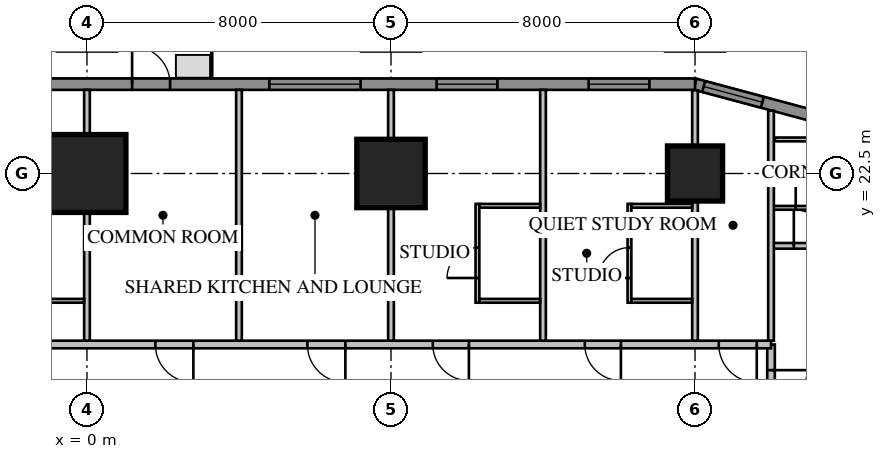
"""IFC4 building model, lengths in metres.
Left out: names, types, materials, properties, quantities, classifications, styles, units other than length and angle.
Written with IfcOpenShell. Run it as: python <this file> out.ifc"""

import sys

from ifc_helpers import new_model, si_unit, direction, frame, frame_2d, origin, origin_2d, place, context, subcontext, project, spatial, rectangle, extrude, element, fill, save


model = new_model("IFC4")
c1 = context("Model", 3, precision=1e-05, world=origin(), true_north=direction((0.0, 1.0)))
c2 = subcontext(c1, "Body", "Model", "MODEL_VIEW")
j1 = project(units=[si_unit("LENGTHUNIT", "METRE"), si_unit("PLANEANGLEUNIT", "RADIAN")], contexts=[c1])
p1 = place(None, origin())
s1 = spatial("IfcSite", under=j1, at=p1, CompositionType="ELEMENT")
p2 = place(p1, origin())
s2 = spatial("IfcBuilding", under=s1, at=p2, CompositionType="ELEMENT")
p3 = place(p2, frame((0.0, 0.0, 42.95)))
s3 = spatial("IfcBuildingStorey", under=s2, at=p3, CompositionType="ELEMENT", Elevation=42.95)
p4 = place(p3, frame((16.0, 22.5, 0.0), z_axis=(0.0, 0.0, 1.0), x_axis=(1.0, 0.0, 0.0)))
e1 = element("IfcColumn", 1, at=p4, inside=s3, PredefinedType="COLUMN", context=c2, shape_type="SweptSolid", body=[
    extrude(rectangle(XDim=1.45, YDim=1.45, at=origin_2d()), origin(), (0.0, 0.0, 1.0), 3.85),
])
p5 = place(p3, frame((8.0, 22.5, 0.0), z_axis=(0.0, 0.0, 1.0), x_axis=(1.0, 0.0, 0.0)))
e2 = element("IfcColumn", 2, at=p5, inside=s3, PredefinedType="COLUMN", context=c2, shape_type="SweptSolid", body=[
    extrude(rectangle(XDim=1.8, YDim=1.8, at=origin_2d()), origin(), (0.0, 0.0, 1.0), 3.85),
])
p6 = place(p3, frame((0.0, 22.5, 0.0), z_axis=(0.0, 0.0, 1.0), x_axis=(1.0, 0.0, 0.0)))
e3 = element("IfcColumn", 3, at=p6, inside=s3, PredefinedType="COLUMN", context=c2, shape_type="SweptSolid", body=[
    extrude(rectangle(XDim=2.05, YDim=2.05, at=origin_2d()), origin(), (0.0, 0.0, 1.0), 3.85),
])
p7 = place(p3, frame((20.425, 23.664, 0.0), z_axis=(0.0, 0.0, 1.0), x_axis=(-0.965920218567, 0.258839972501, 0.0)))
e4 = element("IfcWall", 4, at=p7, inside=s3, PredefinedType="SOLIDWALL", context=c2, shape_type="SweptSolid", body=[
    extrude(rectangle(XDim=4.581, YDim=0.3, at=frame_2d((2.291, 0.0))), origin(), (0.0, 0.0, 1.0), 3.65),
])
p8 = place(p7, frame((2.746, 0.0, 0.75)))
e5 = element("IfcOpeningElement", 5, at=p8, cuts=e4, PredefinedType="OPENING", context=c2, shape_type="SweptSolid", body=[
    extrude(rectangle(XDim=1.6, YDim=1.8, at=frame_2d((0.8, 0.9))), frame((0.0, 0.17, 0.0), z_axis=(0.0, -1.0, 0.0), x_axis=(1.0, 0.0, 0.0)), (0.0, 0.0, 1.0), 0.34),
])
p9 = place(p3, frame((16.0, 24.85, 0.0), z_axis=(0.0, 0.0, 1.0), x_axis=(-1.0, 0.0, 0.0)))
e6 = element("IfcWall", 6, at=p9, inside=s3, PredefinedType="SOLIDWALL", context=c2, shape_type="SweptSolid", body=[
    extrude(rectangle(XDim=32.0, YDim=0.3, at=frame_2d((16.0, 0.0))), origin(), (0.0, 0.0, 1.0), 3.65),
])
p10 = place(p9, frame((1.2, 0.0, 0.75)))
e7 = element("IfcOpeningElement", 7, at=p10, cuts=e6, PredefinedType="OPENING", context=c2, shape_type="SweptSolid", body=[
    extrude(rectangle(XDim=1.6, YDim=1.8, at=frame_2d((0.8, 0.9))), frame((0.0, 0.17, 0.0), z_axis=(0.0, -1.0, 0.0), x_axis=(1.0, 0.0, 0.0)), (0.0, 0.0, 1.0), 0.34),
])
p11 = place(p9, frame((5.2, 0.0, 0.75)))
e8 = element("IfcOpeningElement", 8, at=p11, cuts=e6, PredefinedType="OPENING", context=c2, shape_type="SweptSolid", body=[
    extrude(rectangle(XDim=1.6, YDim=1.8, at=frame_2d((0.8, 0.9))), frame((0.0, 0.17, 0.0), z_axis=(0.0, -1.0, 0.0), x_axis=(1.0, 0.0, 0.0)), (0.0, 0.0, 1.0), 0.34),
])
p12 = place(p9, frame((17.2, 0.0, 0.75)))
e9 = element("IfcOpeningElement", 9, at=p12, cuts=e6, PredefinedType="OPENING", context=c2, shape_type="SweptSolid", body=[
    extrude(rectangle(XDim=1.6, YDim=1.8, at=frame_2d((0.8, 0.9))), frame((0.0, 0.17, 0.0), z_axis=(0.0, -1.0, 0.0), x_axis=(1.0, 0.0, 0.0)), (0.0, 0.0, 1.0), 0.34),
])
p13 = place(p9, frame((21.2, 0.0, 0.75)))
e10 = element("IfcOpeningElement", 10, at=p13, cuts=e6, PredefinedType="OPENING", context=c2, shape_type="SweptSolid", body=[
    extrude(rectangle(XDim=1.6, YDim=1.8, at=frame_2d((0.8, 0.9))), frame((0.0, 0.17, 0.0), z_axis=(0.0, -1.0, 0.0), x_axis=(1.0, 0.0, 0.0)), (0.0, 0.0, 1.0), 0.34),
])
p14 = place(p9, frame((25.2, 0.0, 0.75)))
e11 = element("IfcOpeningElement", 11, at=p14, cuts=e6, PredefinedType="OPENING", context=c2, shape_type="SweptSolid", body=[
    extrude(rectangle(XDim=1.6, YDim=1.8, at=frame_2d((0.8, 0.9))), frame((0.0, 0.17, 0.0), z_axis=(0.0, -1.0, 0.0), x_axis=(1.0, 0.0, 0.0)), (0.0, 0.0, 1.0), 0.34),
])
p15 = place(p9, frame((29.2, 0.0, 0.75)))
e12 = element("IfcOpeningElement", 12, at=p15, cuts=e6, PredefinedType="OPENING", context=c2, shape_type="SweptSolid", body=[
    extrude(rectangle(XDim=1.6, YDim=1.8, at=frame_2d((0.8, 0.9))), frame((0.0, 0.17, 0.0), z_axis=(0.0, -1.0, 0.0), x_axis=(1.0, 0.0, 0.0)), (0.0, 0.0, 1.0), 0.34),
])
p16 = place(p9, frame((8.8, 0.0, 0.75)))
e13 = element("IfcOpeningElement", 13, at=p16, cuts=e6, PredefinedType="OPENING", context=c2, shape_type="SweptSolid", body=[
    extrude(rectangle(XDim=2.4, YDim=1.8, at=frame_2d((1.2, 0.9))), frame((0.0, 0.17, 0.0), z_axis=(0.0, -1.0, 0.0), x_axis=(1.0, 0.0, 0.0)), (0.0, 0.0, 1.0), 0.34),
])
p17 = place(p9, frame((13.812, 0.0, 0.0)))
e14 = element("IfcOpeningElement", 14, at=p17, cuts=e6, PredefinedType="OPENING", context=c2, shape_type="SweptSolid", body=[
    extrude(rectangle(XDim=1.0, YDim=2.4, at=frame_2d((0.5, 1.2))), frame((0.0, 0.17, 0.0), z_axis=(0.0, -1.0, 0.0), x_axis=(1.0, 0.0, 0.0)), (0.0, 0.0, 1.0), 0.34),
])
p18 = place(p3, frame((18.0, -18.0, 0.0), z_axis=(0.0, 0.0, 1.0), x_axis=(0.0, 1.0, 0.0)))
e15 = element("IfcWall", 15, at=p18, inside=s3, PredefinedType="PARTITIONING", context=c2, shape_type="SweptSolid", body=[
    extrude(rectangle(XDim=36.0, YDim=0.2, at=frame_2d((18.0, 0.0))), origin(), (0.0, 0.0, 1.0), 3.65),
])
p19 = place(p18, frame((10.4, 0.0, 0.0)))
e16 = element("IfcOpeningElement", 16, at=p19, cuts=e15, PredefinedType="OPENING", context=c2, shape_type="SweptSolid", body=[
    extrude(rectangle(XDim=1.0, YDim=2.1, at=frame_2d((0.5, 1.05))), frame((0.0, 0.12, 0.0), z_axis=(0.0, -1.0, 0.0), x_axis=(1.0, 0.0, 0.0)), (0.0, 0.0, 1.0), 0.24),
])
p20 = place(p18, frame((14.4, 0.0, 0.0)))
e17 = element("IfcOpeningElement", 17, at=p20, cuts=e15, PredefinedType="OPENING", context=c2, shape_type="SweptSolid", body=[
    extrude(rectangle(XDim=1.0, YDim=2.1, at=frame_2d((0.5, 1.05))), frame((0.0, 0.12, 0.0), z_axis=(0.0, -1.0, 0.0), x_axis=(1.0, 0.0, 0.0)), (0.0, 0.0, 1.0), 0.24),
])
p21 = place(p18, frame((0.375, 0.0, 0.0)))
e18 = element("IfcOpeningElement", 18, at=p21, cuts=e15, PredefinedType="OPENING", context=c2, shape_type="SweptSolid", body=[
    extrude(rectangle(XDim=1.0, YDim=2.1, at=frame_2d((0.5, 1.05))), frame((0.0, 0.12, 0.0), z_axis=(0.0, -1.0, 0.0), x_axis=(1.0, 0.0, 0.0)), (0.0, 0.0, 1.0), 0.24),
])
p22 = place(p18, frame((34.375, 0.0, 0.0)))
e19 = element("IfcOpeningElement", 19, at=p22, cuts=e15, PredefinedType="OPENING", context=c2, shape_type="SweptSolid", body=[
    extrude(rectangle(XDim=0.95, YDim=2.1, at=frame_2d((0.475, 1.05))), frame((0.0, 0.12, 0.0), z_axis=(0.0, -1.0, 0.0), x_axis=(1.0, 0.0, 0.0)), (0.0, 0.0, 1.0), 0.24),
])
p23 = place(p3, frame((18.065, 21.596, 0.0), z_axis=(0.0, 0.0, 1.0), x_axis=(1.0, 0.0, 0.0)))
e20 = element("IfcWall", 20, at=p23, inside=s3, PredefinedType="PARTITIONING", context=c2, shape_type="SweptSolid", body=[
    extrude(rectangle(XDim=2.335, YDim=0.1, at=frame_2d((1.167, 0.0))), origin(), (0.0, 0.0, 1.0), 3.65),
])
p24 = place(p23, frame((0.585, 0.0, 0.0)))
e21 = element("IfcOpeningElement", 21, at=p24, cuts=e20, PredefinedType="OPENING", context=c2, shape_type="SweptSolid", body=[
    extrude(rectangle(XDim=0.8, YDim=2.1, at=frame_2d((0.4, 1.05))), frame((0.0, 0.07, 0.0), z_axis=(0.0, -1.0, 0.0), x_axis=(1.0, 0.0, 0.0)), (0.0, 0.0, 1.0), 0.14),
])
p25 = place(p3, frame((18.1, 23.396, 0.0), z_axis=(0.0, 0.0, 1.0), x_axis=(1.0, 0.0, 0.0)))
e22 = element("IfcWall", 22, at=p25, inside=s3, PredefinedType="PARTITIONING", context=c2, shape_type="SweptSolid", body=[
    extrude(rectangle(XDim=2.3, YDim=0.1, at=frame_2d((1.15, 0.0))), origin(), (0.0, 0.0, 1.0), 3.65),
])
p26 = place(p3, frame((18.065, 20.596, 0.0), z_axis=(0.0, 0.0, 1.0), x_axis=(1.0, 0.0, 0.0)))
e23 = element("IfcWall", 23, at=p26, inside=s3, PredefinedType="PARTITIONING", context=c2, shape_type="SweptSolid", body=[
    extrude(rectangle(XDim=5.209, YDim=0.15, at=frame_2d((2.604, 0.0))), origin(), (0.0, 0.0, 1.0), 3.65),
])
p27 = place(p26, frame((0.535, 0.0, 0.0)))
e24 = element("IfcOpeningElement", 24, at=p27, cuts=e23, PredefinedType="OPENING", context=c2, shape_type="SweptSolid", body=[
    extrude(rectangle(XDim=0.95, YDim=2.1, at=frame_2d((0.475, 1.05))), frame((0.0, 0.095, 0.0), z_axis=(0.0, -1.0, 0.0), x_axis=(1.0, 0.0, 0.0)), (0.0, 0.0, 1.0), 0.19),
])
p28 = place(p3, frame((18.0, 18.0, 0.0), z_axis=(0.0, 0.0, 1.0), x_axis=(-1.0, 0.0, 0.0)))
e25 = element("IfcWall", 25, at=p28, inside=s3, PredefinedType="PARTITIONING", context=c2, shape_type="SweptSolid", body=[
    extrude(rectangle(XDim=36.0, YDim=0.2, at=frame_2d((18.0, 0.0))), origin(), (0.0, 0.0, 1.0), 3.65),
])
p29 = place(p28, frame((0.375, 0.0, 0.0)))
e26 = element("IfcOpeningElement", 26, at=p29, cuts=e25, PredefinedType="OPENING", context=c2, shape_type="SweptSolid", body=[
    extrude(rectangle(XDim=1.0, YDim=2.1, at=frame_2d((0.5, 1.05))), frame((0.0, 0.12, 0.0), z_axis=(0.0, -1.0, 0.0), x_axis=(1.0, 0.0, 0.0)), (0.0, 0.0, 1.0), 0.24),
])
p30 = place(p28, frame((3.95, 0.0, 0.0)))
e27 = element("IfcOpeningElement", 27, at=p30, cuts=e25, PredefinedType="OPENING", context=c2, shape_type="SweptSolid", body=[
    extrude(rectangle(XDim=0.95, YDim=2.1, at=frame_2d((0.475, 1.05))), frame((0.0, 0.12, 0.0), z_axis=(0.0, -1.0, 0.0), x_axis=(1.0, 0.0, 0.0)), (0.0, 0.0, 1.0), 0.24),
])
p31 = place(p28, frame((7.95, 0.0, 0.0)))
e28 = element("IfcOpeningElement", 28, at=p31, cuts=e25, PredefinedType="OPENING", context=c2, shape_type="SweptSolid", body=[
    extrude(rectangle(XDim=0.95, YDim=2.1, at=frame_2d((0.475, 1.05))), frame((0.0, 0.12, 0.0), z_axis=(0.0, -1.0, 0.0), x_axis=(1.0, 0.0, 0.0)), (0.0, 0.0, 1.0), 0.24),
])
p32 = place(p28, frame((19.95, 0.0, 0.0)))
e29 = element("IfcOpeningElement", 29, at=p32, cuts=e25, PredefinedType="OPENING", context=c2, shape_type="SweptSolid", body=[
    extrude(rectangle(XDim=0.95, YDim=2.1, at=frame_2d((0.475, 1.05))), frame((0.0, 0.12, 0.0), z_axis=(0.0, -1.0, 0.0), x_axis=(1.0, 0.0, 0.0)), (0.0, 0.0, 1.0), 0.24),
])
p33 = place(p28, frame((23.95, 0.0, 0.0)))
e30 = element("IfcOpeningElement", 30, at=p33, cuts=e25, PredefinedType="OPENING", context=c2, shape_type="SweptSolid", body=[
    extrude(rectangle(XDim=0.95, YDim=2.1, at=frame_2d((0.475, 1.05))), frame((0.0, 0.12, 0.0), z_axis=(0.0, -1.0, 0.0), x_axis=(1.0, 0.0, 0.0)), (0.0, 0.0, 1.0), 0.24),
])
p34 = place(p28, frame((27.95, 0.0, 0.0)))
e31 = element("IfcOpeningElement", 31, at=p34, cuts=e25, PredefinedType="OPENING", context=c2, shape_type="SweptSolid", body=[
    extrude(rectangle(XDim=0.95, YDim=2.1, at=frame_2d((0.475, 1.05))), frame((0.0, 0.12, 0.0), z_axis=(0.0, -1.0, 0.0), x_axis=(1.0, 0.0, 0.0)), (0.0, 0.0, 1.0), 0.24),
])
p35 = place(p28, frame((31.95, 0.0, 0.0)))
e32 = element("IfcOpeningElement", 32, at=p35, cuts=e25, PredefinedType="OPENING", context=c2, shape_type="SweptSolid", body=[
    extrude(rectangle(XDim=0.95, YDim=2.1, at=frame_2d((0.475, 1.05))), frame((0.0, 0.12, 0.0), z_axis=(0.0, -1.0, 0.0), x_axis=(1.0, 0.0, 0.0)), (0.0, 0.0, 1.0), 0.24),
])
p36 = place(p28, frame((34.375, 0.0, 0.0)))
e33 = element("IfcOpeningElement", 33, at=p36, cuts=e25, PredefinedType="OPENING", context=c2, shape_type="SweptSolid", body=[
    extrude(rectangle(XDim=0.95, YDim=2.1, at=frame_2d((0.475, 1.05))), frame((0.0, 0.12, 0.0), z_axis=(0.0, -1.0, 0.0), x_axis=(1.0, 0.0, 0.0)), (0.0, 0.0, 1.0), 0.24),
])
p37 = place(p28, frame((11.2, 0.0, 0.0)))
e34 = element("IfcOpeningElement", 34, at=p37, cuts=e25, PredefinedType="OPENING", context=c2, shape_type="SweptSolid", body=[
    extrude(rectangle(XDim=1.0, YDim=2.1, at=frame_2d((0.5, 1.05))), frame((0.0, 0.12, 0.0), z_axis=(0.0, -1.0, 0.0), x_axis=(1.0, 0.0, 0.0)), (0.0, 0.0, 1.0), 0.24),
])
p38 = place(p28, frame((15.2, 0.0, 0.0)))
e35 = element("IfcOpeningElement", 35, at=p38, cuts=e25, PredefinedType="OPENING", context=c2, shape_type="SweptSolid", body=[
    extrude(rectangle(XDim=1.0, YDim=2.1, at=frame_2d((0.5, 1.05))), frame((0.0, 0.12, 0.0), z_axis=(0.0, -1.0, 0.0), x_axis=(1.0, 0.0, 0.0)), (0.0, 0.0, 1.0), 0.24),
])
p39 = place(p3, frame((18.0, 18.1, 0.0), z_axis=(0.0, 0.0, 1.0), x_axis=(0.0, 1.0, 0.0)))
e36 = element("IfcWall", 36, at=p39, inside=s3, PredefinedType="PARTITIONING", context=c2, shape_type="SweptSolid", body=[
    extrude(rectangle(XDim=6.053, YDim=0.15, at=frame_2d((3.027, 0.0))), origin(), (0.0, 0.0, 1.0), 3.65),
])
p40 = place(p3, frame((16.0, 18.1, 0.0), z_axis=(0.0, 0.0, 1.0), x_axis=(0.0, 1.0, 0.0)))
e37 = element("IfcWall", 37, at=p40, inside=s3, PredefinedType="PARTITIONING", context=c2, shape_type="SweptSolid", body=[
    extrude(rectangle(XDim=6.589, YDim=0.15, at=frame_2d((3.295, 0.0))), origin(), (0.0, 0.0, 1.0), 3.65),
])
for number, where, z_axis, x_axis in (
    (38, (12.0, 18.1, 0.0), (0.0, 0.0, 1.0), (0.0, 1.0, 0.0)),
    (39, (8.0, 18.1, 0.0), (0.0, 0.0, 1.0), (0.0, 1.0, 0.0)),
    (40, (4.0, 18.1, 0.0), (0.0, 0.0, 1.0), (0.0, 1.0, 0.0)),
):
    element("IfcWall", number, at=place(p3, frame(where, z_axis=z_axis, x_axis=x_axis)), inside=s3, PredefinedType="PARTITIONING", context=c2, shape_type="SweptSolid", body=[
        extrude(rectangle(XDim=6.6, YDim=0.15, at=frame_2d((3.3, 0.0))), origin(), (0.0, 0.0, 1.0), 3.65),
    ])
p41 = place(p3, frame((0.0, 18.1, 0.0), z_axis=(0.0, 0.0, 1.0), x_axis=(0.0, 1.0, 0.0)))
e41 = element("IfcWall", 41, at=p41, inside=s3, PredefinedType="PARTITIONING", context=c2, shape_type="SweptSolid", body=[
    extrude(rectangle(XDim=6.6, YDim=0.15, at=frame_2d((3.3, 0.0))), origin(), (0.0, 0.0, 1.0), 2.809),
])
p42 = place(p3, frame((14.275, 19.1, 0.0), z_axis=(0.0, 0.0, 1.0), x_axis=(0.0, 1.0, 0.0)))
e42 = element("IfcWall", 42, at=p42, inside=s3, PredefinedType="PARTITIONING", context=c2, shape_type="SweptSolid", body=[
    extrude(rectangle(XDim=2.6, YDim=0.1, at=frame_2d((1.3, 0.0))), origin(), (0.0, 0.0, 1.0), 3.65),
])
p43 = place(p42, frame((0.65, 0.0, 0.0)))
e43 = element("IfcOpeningElement", 43, at=p43, cuts=e42, PredefinedType="OPENING", context=c2, shape_type="SweptSolid", body=[
    extrude(rectangle(XDim=0.8, YDim=2.1, at=frame_2d((0.4, 1.05))), frame((0.0, 0.07, 0.0), z_axis=(0.0, -1.0, 0.0), x_axis=(1.0, 0.0, 0.0)), (0.0, 0.0, 1.0), 0.14),
])
p44 = place(p3, frame((15.925, 21.65, 0.0), z_axis=(0.0, 0.0, 1.0), x_axis=(-1.0, 0.0, 0.0)))
e44 = element("IfcWall", 44, at=p44, inside=s3, PredefinedType="PARTITIONING", context=c2, shape_type="SweptSolid", body=[
    extrude(rectangle(XDim=1.6, YDim=0.1, at=frame_2d((0.8, 0.0))), origin(), (0.0, 0.0, 1.0), 3.65),
])
p45 = place(p3, frame((15.925, 19.15, 0.0), z_axis=(0.0, 0.0, 1.0), x_axis=(-1.0, 0.0, 0.0)))
e45 = element("IfcWall", 45, at=p45, inside=s3, PredefinedType="PARTITIONING", context=c2, shape_type="SweptSolid", body=[
    extrude(rectangle(XDim=1.6, YDim=0.1, at=frame_2d((0.8, 0.0))), origin(), (0.0, 0.0, 1.0), 3.122),
])
p46 = place(p3, frame((10.275, 19.1, 0.0), z_axis=(0.0, 0.0, 1.0), x_axis=(0.0, 1.0, 0.0)))
e46 = element("IfcWall", 46, at=p46, inside=s3, PredefinedType="PARTITIONING", context=c2, shape_type="SweptSolid", body=[
    extrude(rectangle(XDim=2.6, YDim=0.1, at=frame_2d((1.3, 0.0))), origin(), (0.0, 0.0, 1.0), 3.65),
])
p47 = place(p46, frame((0.65, 0.0, 0.0)))
e47 = element("IfcOpeningElement", 47, at=p47, cuts=e46, PredefinedType="OPENING", context=c2, shape_type="SweptSolid", body=[
    extrude(rectangle(XDim=0.8, YDim=2.1, at=frame_2d((0.4, 1.05))), frame((0.0, 0.07, 0.0), z_axis=(0.0, -1.0, 0.0), x_axis=(1.0, 0.0, 0.0)), (0.0, 0.0, 1.0), 0.14),
])
p48 = place(p3, frame((11.925, 21.65, 0.0), z_axis=(0.0, 0.0, 1.0), x_axis=(-1.0, 0.0, 0.0)))
e48 = element("IfcWall", 48, at=p48, inside=s3, PredefinedType="PARTITIONING", context=c2, shape_type="SweptSolid", body=[
    extrude(rectangle(XDim=1.6, YDim=0.1, at=frame_2d((0.8, 0.0))), origin(), (0.0, 0.0, 1.0), 3.65),
])
p49 = place(p3, frame((11.925, 19.15, 0.0), z_axis=(0.0, 0.0, 1.0), x_axis=(-1.0, 0.0, 0.0)))
e49 = element("IfcWall", 49, at=p49, inside=s3, PredefinedType="PARTITIONING", context=c2, shape_type="SweptSolid", body=[
    extrude(rectangle(XDim=1.6, YDim=0.1, at=frame_2d((0.8, 0.0))), origin(), (0.0, 0.0, 1.0), 3.122),
])
p50 = place(p3, frame((-0.075, 21.65, 0.0), z_axis=(0.0, 0.0, 1.0), x_axis=(-1.0, 0.0, 0.0)))
e50 = element("IfcWall", 50, at=p50, inside=s3, PredefinedType="PARTITIONING", context=c2, shape_type="SweptSolid", body=[
    extrude(rectangle(XDim=1.6, YDim=0.1, at=frame_2d((0.8, 0.0))), origin(), (0.0, 0.0, 1.0), 3.65),
])
p51 = place(p3, frame((-0.075, 19.15, 0.0), z_axis=(0.0, 0.0, 1.0), x_axis=(-1.0, 0.0, 0.0)))
e51 = element("IfcWall", 51, at=p51, inside=s3, PredefinedType="PARTITIONING", context=c2, shape_type="SweptSolid", body=[
    extrude(rectangle(XDim=1.6, YDim=0.1, at=frame_2d((0.8, 0.0))), origin(), (0.0, 0.0, 1.0), 3.122),
])
p52 = place(p8, origin())
e52 = element("IfcWindow", 52, at=p52, inside=s3, PartitioningType="SINGLE_PANEL", PredefinedType="WINDOW", context=c2, shape_type="SweptSolid", body=[
    extrude(rectangle(XDim=1.6, YDim=1.8, at=frame_2d((0.8, 0.9))), frame((0.0, 0.03, 0.0), z_axis=(0.0, -1.0, 0.0), x_axis=(1.0, 0.0, 0.0)), (0.0, 0.0, 1.0), 0.06),
])
fill(e5, e52)
p53 = place(p10, origin())
e53 = element("IfcWindow", 53, at=p53, inside=s3, PartitioningType="SINGLE_PANEL", PredefinedType="WINDOW", context=c2, shape_type="SweptSolid", body=[
    extrude(rectangle(XDim=1.6, YDim=1.8, at=frame_2d((0.8, 0.9))), frame((0.0, 0.03, 0.0), z_axis=(0.0, -1.0, 0.0), x_axis=(1.0, 0.0, 0.0)), (0.0, 0.0, 1.0), 0.06),
])
fill(e7, e53)
p54 = place(p11, origin())
e54 = element("IfcWindow", 54, at=p54, inside=s3, PartitioningType="SINGLE_PANEL", PredefinedType="WINDOW", context=c2, shape_type="SweptSolid", body=[
    extrude(rectangle(XDim=1.6, YDim=1.8, at=frame_2d((0.8, 0.9))), frame((0.0, 0.03, 0.0), z_axis=(0.0, -1.0, 0.0), x_axis=(1.0, 0.0, 0.0)), (0.0, 0.0, 1.0), 0.06),
])
fill(e8, e54)
p55 = place(p16, origin())
e55 = element("IfcWindow", 55, at=p55, inside=s3, PartitioningType="SINGLE_PANEL", PredefinedType="WINDOW", context=c2, shape_type="SweptSolid", body=[
    extrude(rectangle(XDim=2.4, YDim=1.8, at=frame_2d((1.2, 0.9))), frame((0.0, 0.03, 0.0), z_axis=(0.0, -1.0, 0.0), x_axis=(1.0, 0.0, 0.0)), (0.0, 0.0, 1.0), 0.06),
])
fill(e13, e55)
p56 = place(p17, origin())
e56 = element("IfcDoor", 56, at=p56, inside=s3, OperationType="SINGLE_SWING_RIGHT", PredefinedType="DOOR", context=c2, shape_type="SweptSolid", body=[
    extrude(rectangle(XDim=1.0, YDim=2.4, at=frame_2d((0.5, 1.2))), frame((0.0, 0.025, 0.0), z_axis=(0.0, -1.0, 0.0), x_axis=(1.0, 0.0, 0.0)), (0.0, 0.0, 1.0), 0.05),
])
fill(e14, e56)
p57 = place(p22, origin())
e57 = element("IfcDoor", 57, at=p57, inside=s3, OperationType="SINGLE_SWING_RIGHT", PredefinedType="DOOR", context=c2, shape_type="SweptSolid", body=[
    extrude(rectangle(XDim=0.95, YDim=2.1, at=frame_2d((0.475, 1.05))), frame((0.0, 0.025, 0.0), z_axis=(0.0, -1.0, 0.0), x_axis=(1.0, 0.0, 0.0)), (0.0, 0.0, 1.0), 0.05),
])
fill(e19, e57)
p58 = place(p24, origin())
e58 = element("IfcDoor", 58, at=p58, inside=s3, OperationType="SINGLE_SWING_LEFT", PredefinedType="DOOR", context=c2, shape_type="SweptSolid", body=[
    extrude(rectangle(XDim=0.8, YDim=2.1, at=frame_2d((0.4, 1.05))), frame((0.0, 0.025, 0.0), z_axis=(0.0, -1.0, 0.0), x_axis=(1.0, 0.0, 0.0)), (0.0, 0.0, 1.0), 0.05),
])
fill(e21, e58)
p59 = place(p27, origin())
e59 = element("IfcDoor", 59, at=p59, inside=s3, OperationType="SINGLE_SWING_LEFT", PredefinedType="DOOR", context=c2, shape_type="SweptSolid", body=[
    extrude(rectangle(XDim=0.95, YDim=2.1, at=frame_2d((0.475, 1.05))), frame((0.0, 0.025, 0.0), z_axis=(0.0, -1.0, 0.0), x_axis=(1.0, 0.0, 0.0)), (0.0, 0.0, 1.0), 0.05),
])
fill(e24, e59)
p60 = place(p29, origin())
e60 = element("IfcDoor", 60, at=p60, inside=s3, OperationType="SINGLE_SWING_LEFT", PredefinedType="DOOR", context=c2, shape_type="SweptSolid", body=[
    extrude(rectangle(XDim=1.0, YDim=2.1, at=frame_2d((0.5, 1.05))), frame((0.0, 0.025, 0.0), z_axis=(0.0, -1.0, 0.0), x_axis=(1.0, 0.0, 0.0)), (0.0, 0.0, 1.0), 0.05),
])
fill(e26, e60)
p61 = place(p30, origin())
e61 = element("IfcDoor", 61, at=p61, inside=s3, OperationType="SINGLE_SWING_LEFT", PredefinedType="DOOR", context=c2, shape_type="SweptSolid", body=[
    extrude(rectangle(XDim=0.95, YDim=2.1, at=frame_2d((0.475, 1.05))), frame((0.0, 0.025, 0.0), z_axis=(0.0, -1.0, 0.0), x_axis=(1.0, 0.0, 0.0)), (0.0, 0.0, 1.0), 0.05),
])
fill(e27, e61)
p62 = place(p43, origin())
e62 = element("IfcDoor", 62, at=p62, inside=s3, OperationType="SINGLE_SWING_LEFT", PredefinedType="DOOR", context=c2, shape_type="SweptSolid", body=[
    extrude(rectangle(XDim=0.8, YDim=2.1, at=frame_2d((0.4, 1.05))), frame((0.0, 0.025, 0.0), z_axis=(0.0, -1.0, 0.0), x_axis=(1.0, 0.0, 0.0)), (0.0, 0.0, 1.0), 0.05),
])
fill(e43, e62)
p63 = place(p31, origin())
e63 = element("IfcDoor", 63, at=p63, inside=s3, OperationType="SINGLE_SWING_LEFT", PredefinedType="DOOR", context=c2, shape_type="SweptSolid", body=[
    extrude(rectangle(XDim=0.95, YDim=2.1, at=frame_2d((0.475, 1.05))), frame((0.0, 0.025, 0.0), z_axis=(0.0, -1.0, 0.0), x_axis=(1.0, 0.0, 0.0)), (0.0, 0.0, 1.0), 0.05),
])
fill(e28, e63)
p64 = place(p47, origin())
e64 = element("IfcDoor", 64, at=p64, inside=s3, OperationType="SINGLE_SWING_LEFT", PredefinedType="DOOR", context=c2, shape_type="SweptSolid", body=[
    extrude(rectangle(XDim=0.8, YDim=2.1, at=frame_2d((0.4, 1.05))), frame((0.0, 0.025, 0.0), z_axis=(0.0, -1.0, 0.0), x_axis=(1.0, 0.0, 0.0)), (0.0, 0.0, 1.0), 0.05),
])
fill(e47, e64)
p65 = place(p37, origin())
e65 = element("IfcDoor", 65, at=p65, inside=s3, OperationType="SINGLE_SWING_LEFT", PredefinedType="DOOR", context=c2, shape_type="SweptSolid", body=[
    extrude(rectangle(XDim=1.0, YDim=2.1, at=frame_2d((0.5, 1.05))), frame((0.0, 0.025, 0.0), z_axis=(0.0, -1.0, 0.0), x_axis=(1.0, 0.0, 0.0)), (0.0, 0.0, 1.0), 0.05),
])
fill(e34, e65)
p66 = place(p38, origin())
e66 = element("IfcDoor", 66, at=p66, inside=s3, OperationType="SINGLE_SWING_LEFT", PredefinedType="DOOR", context=c2, shape_type="SweptSolid", body=[
    extrude(rectangle(XDim=1.0, YDim=2.1, at=frame_2d((0.5, 1.05))), frame((0.0, 0.025, 0.0), z_axis=(0.0, -1.0, 0.0), x_axis=(1.0, 0.0, 0.0)), (0.0, 0.0, 1.0), 0.05),
])
fill(e35, e66)
save(model, sys.argv[1])
